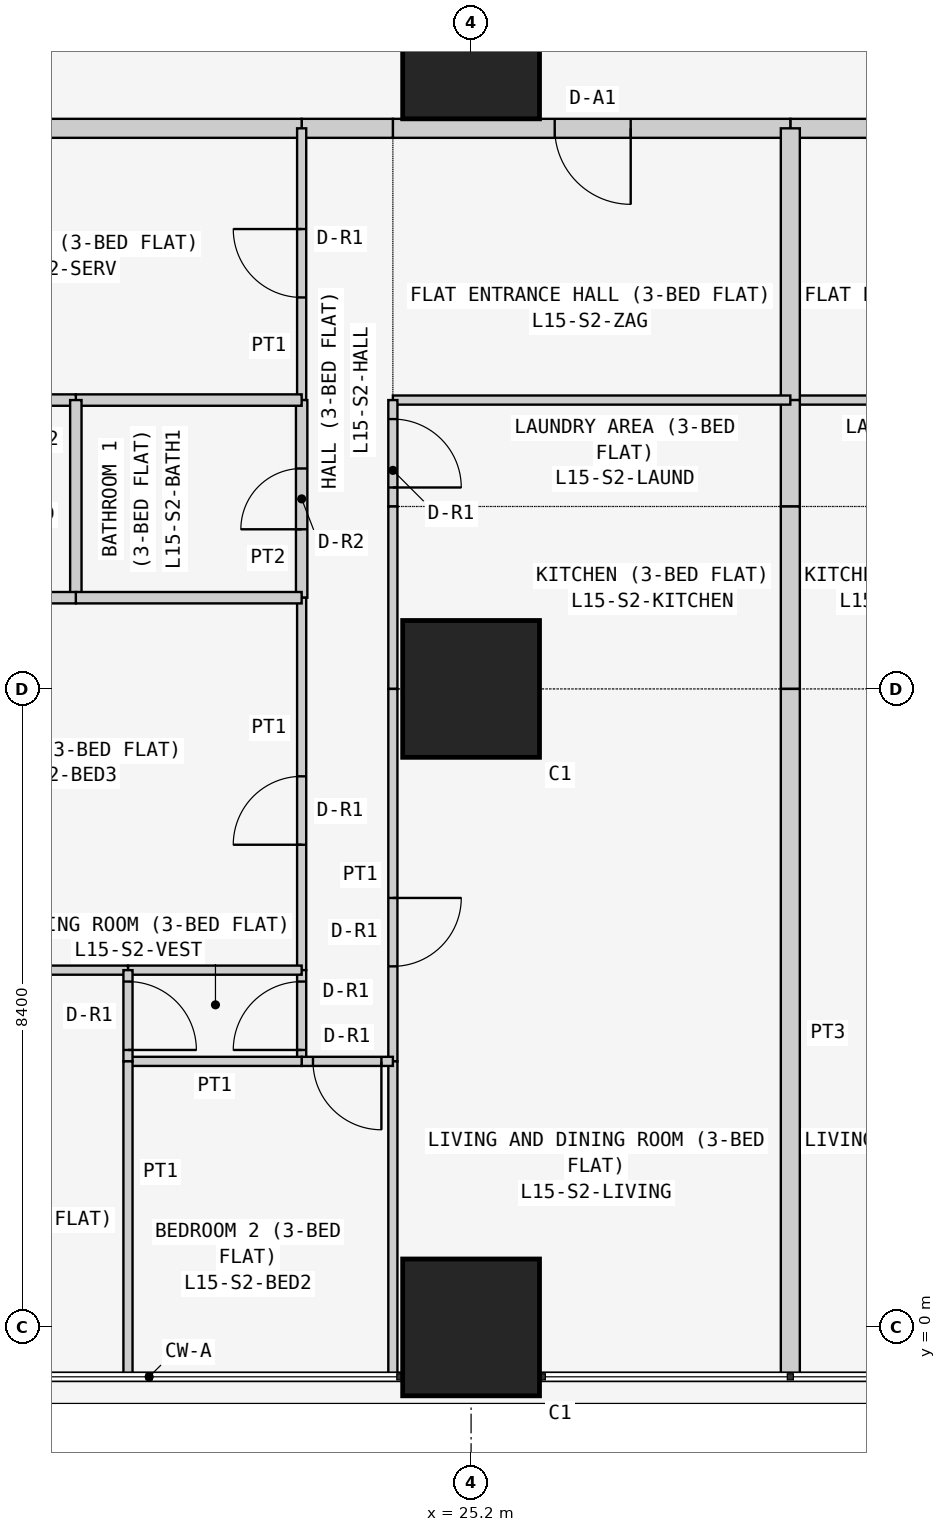
"""IFC4 building model, lengths in metres.
Left out: names, types, materials, properties, quantities, classifications, styles, units other than length and angle.
Written with IfcOpenShell. Run it as: python <this file> out.ifc"""

import sys

from ifc_helpers import new_model, si_unit, direction, frame, frame_2d, origin, origin_2d, place, context, subcontext, project, spatial, rectangle, extrude, element, fill, save


model = new_model("IFC4")
c1 = context("Model", 3, precision=1e-05, world=origin(), true_north=direction((0.0, 1.0)))
c2 = subcontext(c1, "Body", "Model", "MODEL_VIEW")
j1 = project(units=[si_unit("LENGTHUNIT", "METRE"), si_unit("PLANEANGLEUNIT", "RADIAN")], contexts=[c1])
p1 = place(None, origin())
s1 = spatial("IfcSite", under=j1, at=p1, CompositionType="ELEMENT")
p2 = place(p1, origin())
s2 = spatial("IfcBuilding", under=s1, at=p2, CompositionType="ELEMENT")
p3 = place(p2, frame((0.0, 0.0, 63.3)))
s3 = spatial("IfcBuildingStorey", under=s2, at=p3, CompositionType="ELEMENT", Elevation=63.3)
for number, where, z_axis, x_axis in (
    (1, (25.2, 0.0, 0.0), (0.0, 0.0, 1.0), (1.0, 0.0, 0.0)),
    (2, (25.2, 8.4, 0.0), (0.0, 0.0, 1.0), (1.0, 0.0, 0.0)),
    (3, (25.2, 16.8, 0.0), (0.0, 0.0, 1.0), (1.0, 0.0, 0.0)),
):
    element("IfcColumn", number, at=place(p3, frame(where, z_axis=z_axis, x_axis=x_axis)), inside=s3, PredefinedType="COLUMN", context=c2, shape_type="SweptSolid", body=[
        extrude(rectangle(XDim=1.8, YDim=1.8, at=origin_2d()), origin(), (0.0, 0.0, 1.0), 3.6),
    ])
p4 = place(p3, frame((34.629, 15.775, 0.0), z_axis=(0.0, 0.0, 1.0), x_axis=(-1.0, 0.0, 0.0)))
e4 = element("IfcWall", 4, at=p4, inside=s3, PredefinedType="PARTITIONING", context=c2, shape_type="SweptSolid", body=[
    extrude(rectangle(XDim=5.229, YDim=0.25, at=frame_2d((2.615, 0.0))), origin(), (0.0, 0.0, 1.0), 3.45),
])
p5 = place(p4, frame((2.129, 0.0, 0.0)))
e5 = element("IfcOpeningElement", 5, at=p5, cuts=e4, PredefinedType="OPENING", context=c2, shape_type="SweptSolid", body=[
    extrude(rectangle(XDim=1.0, YDim=2.1, at=frame_2d((0.5, 1.05))), frame((0.0, 0.135, 0.0), z_axis=(0.0, -1.0, 0.0), x_axis=(1.0, 0.0, 0.0)), (0.0, 0.0, 1.0), 0.27),
])
p6 = place(p3, frame((29.4, 15.775, 0.0), z_axis=(0.0, 0.0, 1.0), x_axis=(-1.0, 0.0, 0.0)))
e6 = element("IfcWall", 6, at=p6, inside=s3, PredefinedType="PARTITIONING", context=c2, shape_type="SweptSolid", body=[
    extrude(rectangle(XDim=5.229, YDim=0.25, at=frame_2d((2.615, 0.0))), origin(), (0.0, 0.0, 1.0), 3.45),
])
p7 = place(p6, frame((2.1, 0.0, 0.0)))
e7 = element("IfcOpeningElement", 7, at=p7, cuts=e6, PredefinedType="OPENING", context=c2, shape_type="SweptSolid", body=[
    extrude(rectangle(XDim=1.0, YDim=2.1, at=frame_2d((0.5, 1.05))), frame((0.0, 0.135, 0.0), z_axis=(0.0, -1.0, 0.0), x_axis=(1.0, 0.0, 0.0)), (0.0, 0.0, 1.0), 0.27),
])
p8 = place(p3, frame((24.171, 15.775, 0.0), z_axis=(0.0, 0.0, 1.0), x_axis=(-1.0, 0.0, 0.0)))
e8 = element("IfcWall", 8, at=p8, inside=s3, PredefinedType="PARTITIONING", context=c2, shape_type="SweptSolid", body=[
    extrude(rectangle(XDim=1.2, YDim=0.25, at=frame_2d((0.6, 0.0))), origin(), (0.0, 0.0, 1.0), 3.45),
])
p9 = place(p3, frame((22.971, 15.775, 0.0), z_axis=(0.0, 0.0, 1.0), x_axis=(-1.0, 0.0, 0.0)))
e9 = element("IfcWall", 9, at=p9, inside=s3, PredefinedType="PARTITIONING", context=c2, shape_type="SweptSolid", body=[
    extrude(rectangle(XDim=6.871, YDim=0.25, at=frame_2d((3.436, 0.0))), origin(), (0.0, 0.0, 1.0), 3.45),
])
p10 = place(p3, frame((29.4, 12.2, 0.0), z_axis=(0.0, 0.0, 1.0), x_axis=(1.0, 0.0, 0.0)))
e10 = element("IfcWall", 10, at=p10, inside=s3, PredefinedType="PARTITIONING", context=c2, shape_type="SweptSolid", body=[
    extrude(rectangle(XDim=5.229, YDim=0.12, at=frame_2d((2.615, 0.0))), origin(), (0.0, 0.0, 1.0), 3.45),
])
p11 = place(p3, frame((29.4, 15.775, 0.0), z_axis=(0.0, 0.0, 1.0), x_axis=(0.0, -1.0, 0.0)))
e11 = element("IfcWall", 11, at=p11, inside=s3, PredefinedType="PARTITIONING", context=c2, shape_type="SweptSolid", body=[
    extrude(rectangle(XDim=3.575, YDim=0.25, at=frame_2d((1.788, 0.0))), origin(), (0.0, 0.0, 1.0), 2.848),
])
p12 = place(p3, frame((29.4, 12.2, 0.0), z_axis=(0.0, 0.0, 1.0), x_axis=(0.0, -1.0, 0.0)))
e12 = element("IfcWall", 12, at=p12, inside=s3, PredefinedType="PARTITIONING", context=c2, shape_type="SweptSolid", body=[
    extrude(rectangle(XDim=1.4, YDim=0.25, at=frame_2d((0.7, 0.0))), origin(), (0.0, 0.0, 1.0), 2.848),
])
p13 = place(p3, frame((29.4, 10.8, 0.0), z_axis=(0.0, 0.0, 1.0), x_axis=(0.0, -1.0, 0.0)))
e13 = element("IfcWall", 13, at=p13, inside=s3, PredefinedType="PARTITIONING", context=c2, shape_type="SweptSolid", body=[
    extrude(rectangle(XDim=2.4, YDim=0.25, at=frame_2d((1.2, 0.0))), origin(), (0.0, 0.0, 1.0), 2.848),
])
p14 = place(p3, frame((29.4, 8.4, 0.0), z_axis=(0.0, 0.0, 1.0), x_axis=(0.0, -1.0, 0.0)))
e14 = element("IfcWall", 14, at=p14, inside=s3, PredefinedType="PARTITIONING", context=c2, shape_type="SweptSolid", body=[
    extrude(rectangle(XDim=9.05, YDim=0.25, at=frame_2d((4.525, 0.0))), origin(), (0.0, 0.0, 1.0), 2.848),
])
p15 = place(p3, frame((29.4, 12.2, 0.0), z_axis=(0.0, 0.0, 1.0), x_axis=(-1.0, 0.0, 0.0)))
e15 = element("IfcWall", 15, at=p15, inside=s3, PredefinedType="PARTITIONING", context=c2, shape_type="SweptSolid", body=[
    extrude(rectangle(XDim=5.229, YDim=0.12, at=frame_2d((2.615, 0.0))), origin(), (0.0, 0.0, 1.0), 3.45),
])
p16 = place(p3, frame((24.171, 10.8, 0.0), z_axis=(0.0, 0.0, 1.0), x_axis=(0.0, 1.0, 0.0)))
e16 = element("IfcWall", 16, at=p16, inside=s3, PredefinedType="PARTITIONING", context=c2, shape_type="SweptSolid", body=[
    extrude(rectangle(XDim=1.4, YDim=0.12, at=frame_2d((0.7, 0.0))), origin(), (0.0, 0.0, 1.0), 3.45),
])
p17 = place(p16, frame((0.25, 0.0, 0.0)))
e17 = element("IfcOpeningElement", 17, at=p17, cuts=e16, PredefinedType="OPENING", context=c2, shape_type="SweptSolid", body=[
    extrude(rectangle(XDim=0.9, YDim=2.1, at=frame_2d((0.45, 1.05))), frame((0.0, 0.07, 0.0), z_axis=(0.0, -1.0, 0.0), x_axis=(1.0, 0.0, 0.0)), (0.0, 0.0, 1.0), 0.14),
])
p18 = place(p3, frame((24.171, 8.4, 0.0), z_axis=(0.0, 0.0, 1.0), x_axis=(0.0, 1.0, 0.0)))
e18 = element("IfcWall", 18, at=p18, inside=s3, PredefinedType="PARTITIONING", context=c2, shape_type="SweptSolid", body=[
    extrude(rectangle(XDim=2.4, YDim=0.12, at=frame_2d((1.2, 0.0))), origin(), (0.0, 0.0, 1.0), 3.45),
])
p19 = place(p3, frame((24.171, 3.5, 0.0), z_axis=(0.0, 0.0, 1.0), x_axis=(0.0, 1.0, 0.0)))
e19 = element("IfcWall", 19, at=p19, inside=s3, PredefinedType="PARTITIONING", context=c2, shape_type="SweptSolid", body=[
    extrude(rectangle(XDim=4.9, YDim=0.12, at=frame_2d((2.45, 0.0))), origin(), (0.0, 0.0, 1.0), 3.45),
])
p20 = place(p19, frame((1.25, 0.0, 0.0)))
e20 = element("IfcOpeningElement", 20, at=p20, cuts=e19, PredefinedType="OPENING", context=c2, shape_type="SweptSolid", body=[
    extrude(rectangle(XDim=0.9, YDim=2.1, at=frame_2d((0.45, 1.05))), frame((0.0, 0.07, 0.0), z_axis=(0.0, -1.0, 0.0), x_axis=(1.0, 0.0, 0.0)), (0.0, 0.0, 1.0), 0.14),
])
p21 = place(p3, frame((24.171, -0.65, 0.0), z_axis=(0.0, 0.0, 1.0), x_axis=(0.0, 1.0, 0.0)))
e21 = element("IfcWall", 21, at=p21, inside=s3, PredefinedType="PARTITIONING", context=c2, shape_type="SweptSolid", body=[
    extrude(rectangle(XDim=4.15, YDim=0.12, at=frame_2d((2.075, 0.0))), origin(), (0.0, 0.0, 1.0), 3.45),
])
p22 = place(p3, frame((22.971, 12.2, 0.0), z_axis=(0.0, 0.0, 1.0), x_axis=(0.0, 1.0, 0.0)))
e22 = element("IfcWall", 22, at=p22, inside=s3, PredefinedType="PARTITIONING", context=c2, shape_type="SweptSolid", body=[
    extrude(rectangle(XDim=3.575, YDim=0.12, at=frame_2d((1.788, 0.0))), origin(), (0.0, 0.0, 1.0), 3.45),
])
p23 = place(p22, frame((1.35, 0.0, 0.0)))
e23 = element("IfcOpeningElement", 23, at=p23, cuts=e22, PredefinedType="OPENING", context=c2, shape_type="SweptSolid", body=[
    extrude(rectangle(XDim=0.9, YDim=2.1, at=frame_2d((0.45, 1.05))), frame((0.0, 0.07, 0.0), z_axis=(0.0, -1.0, 0.0), x_axis=(1.0, 0.0, 0.0)), (0.0, 0.0, 1.0), 0.14),
])
p24 = place(p3, frame((22.971, 9.6, 0.0), z_axis=(0.0, 0.0, 1.0), x_axis=(0.0, 1.0, 0.0)))
e24 = element("IfcWall", 24, at=p24, inside=s3, PredefinedType="PARTITIONING", context=c2, shape_type="SweptSolid", body=[
    extrude(rectangle(XDim=2.6, YDim=0.15, at=frame_2d((1.3, 0.0))), origin(), (0.0, 0.0, 1.0), 3.45),
])
p25 = place(p24, frame((0.9, 0.0, 0.0)))
e25 = element("IfcOpeningElement", 25, at=p25, cuts=e24, PredefinedType="OPENING", context=c2, shape_type="SweptSolid", body=[
    extrude(rectangle(XDim=0.8, YDim=2.1, at=frame_2d((0.4, 1.05))), frame((0.0, 0.085, 0.0), z_axis=(0.0, -1.0, 0.0), x_axis=(1.0, 0.0, 0.0)), (0.0, 0.0, 1.0), 0.17),
])
p26 = place(p3, frame((22.971, 4.7, 0.0), z_axis=(0.0, 0.0, 1.0), x_axis=(0.0, 1.0, 0.0)))
e26 = element("IfcWall", 26, at=p26, inside=s3, PredefinedType="PARTITIONING", context=c2, shape_type="SweptSolid", body=[
    extrude(rectangle(XDim=4.9, YDim=0.12, at=frame_2d((2.45, 0.0))), origin(), (0.0, 0.0, 1.0), 3.45),
])
p27 = place(p26, frame((1.65, 0.0, 0.0)))
e27 = element("IfcOpeningElement", 27, at=p27, cuts=e26, PredefinedType="OPENING", context=c2, shape_type="SweptSolid", body=[
    extrude(rectangle(XDim=0.9, YDim=2.1, at=frame_2d((0.45, 1.05))), frame((0.0, 0.07, 0.0), z_axis=(0.0, -1.0, 0.0), x_axis=(1.0, 0.0, 0.0)), (0.0, 0.0, 1.0), 0.14),
])
p28 = place(p3, frame((22.971, 3.5, 0.0), z_axis=(0.0, 0.0, 1.0), x_axis=(0.0, 1.0, 0.0)))
e28 = element("IfcWall", 28, at=p28, inside=s3, PredefinedType="PARTITIONING", context=c2, shape_type="SweptSolid", body=[
    extrude(rectangle(XDim=1.2, YDim=0.12, at=frame_2d((0.6, 0.0))), origin(), (0.0, 0.0, 1.0), 3.45),
])
p29 = place(p28, frame((0.15, 0.0, 0.0)))
e29 = element("IfcOpeningElement", 29, at=p29, cuts=e28, PredefinedType="OPENING", context=c2, shape_type="SweptSolid", body=[
    extrude(rectangle(XDim=0.9, YDim=2.1, at=frame_2d((0.45, 1.05))), frame((0.0, 0.07, 0.0), z_axis=(0.0, -1.0, 0.0), x_axis=(1.0, 0.0, 0.0)), (0.0, 0.0, 1.0), 0.14),
])
p30 = place(p3, frame((24.171, 3.5, 0.0), z_axis=(0.0, 0.0, 1.0), x_axis=(-1.0, 0.0, 0.0)))
e30 = element("IfcWall", 30, at=p30, inside=s3, PredefinedType="PARTITIONING", context=c2, shape_type="SweptSolid", body=[
    extrude(rectangle(XDim=1.2, YDim=0.12, at=frame_2d((0.6, 0.0))), origin(), (0.0, 0.0, 1.0), 3.45),
])
p31 = place(p30, frame((0.151, 0.0, 0.0)))
e31 = element("IfcOpeningElement", 31, at=p31, cuts=e30, PredefinedType="OPENING", context=c2, shape_type="SweptSolid", body=[
    extrude(rectangle(XDim=0.9, YDim=2.1, at=frame_2d((0.45, 1.05))), frame((0.0, 0.07, 0.0), z_axis=(0.0, -1.0, 0.0), x_axis=(1.0, 0.0, 0.0)), (0.0, 0.0, 1.0), 0.14),
])
p32 = place(p3, frame((22.971, 12.2, 0.0), z_axis=(0.0, 0.0, 1.0), x_axis=(-1.0, 0.0, 0.0)))
e32 = element("IfcWall", 32, at=p32, inside=s3, PredefinedType="PARTITIONING", context=c2, shape_type="SweptSolid", body=[
    extrude(rectangle(XDim=2.971, YDim=0.15, at=frame_2d((1.485, 0.0))), origin(), (0.0, 0.0, 1.0), 3.45),
])
p33 = place(p3, frame((20.0, 12.2, 0.0), z_axis=(0.0, 0.0, 1.0), x_axis=(-1.0, 0.0, 0.0)))
e33 = element("IfcWall", 33, at=p33, inside=s3, PredefinedType="PARTITIONING", context=c2, shape_type="SweptSolid", body=[
    extrude(rectangle(XDim=3.9, YDim=0.15, at=frame_2d((1.95, 0.0))), origin(), (0.0, 0.0, 1.0), 3.45),
])
p34 = place(p33, frame((1.45, 0.0, 0.0)))
e34 = element("IfcOpeningElement", 34, at=p34, cuts=e33, PredefinedType="OPENING", context=c2, shape_type="SweptSolid", body=[
    extrude(rectangle(XDim=0.8, YDim=2.1, at=frame_2d((0.4, 1.05))), frame((0.0, 0.085, 0.0), z_axis=(0.0, -1.0, 0.0), x_axis=(1.0, 0.0, 0.0)), (0.0, 0.0, 1.0), 0.17),
])
p35 = place(p3, frame((20.0, 9.6, 0.0), z_axis=(0.0, 0.0, 1.0), x_axis=(0.0, 1.0, 0.0)))
e35 = element("IfcWall", 35, at=p35, inside=s3, PredefinedType="PARTITIONING", context=c2, shape_type="SweptSolid", body=[
    extrude(rectangle(XDim=2.6, YDim=0.15, at=frame_2d((1.3, 0.0))), origin(), (0.0, 0.0, 1.0), 3.45),
])
p36 = place(p3, frame((22.971, 9.6, 0.0), z_axis=(0.0, 0.0, 1.0), x_axis=(-1.0, 0.0, 0.0)))
e36 = element("IfcWall", 36, at=p36, inside=s3, PredefinedType="PARTITIONING", context=c2, shape_type="SweptSolid", body=[
    extrude(rectangle(XDim=2.971, YDim=0.15, at=frame_2d((1.485, 0.0))), origin(), (0.0, 0.0, 1.0), 3.45),
])
p37 = place(p3, frame((20.0, 9.6, 0.0), z_axis=(0.0, 0.0, 1.0), x_axis=(-1.0, 0.0, 0.0)))
e37 = element("IfcWall", 37, at=p37, inside=s3, PredefinedType="PARTITIONING", context=c2, shape_type="SweptSolid", body=[
    extrude(rectangle(XDim=3.9, YDim=0.15, at=frame_2d((1.95, 0.0))), origin(), (0.0, 0.0, 1.0), 3.45),
])
p38 = place(p3, frame((22.971, 4.7, 0.0), z_axis=(0.0, 0.0, 1.0), x_axis=(-1.0, 0.0, 0.0)))
e38 = element("IfcWall", 38, at=p38, inside=s3, PredefinedType="PARTITIONING", context=c2, shape_type="SweptSolid", body=[
    extrude(rectangle(XDim=2.285, YDim=0.12, at=frame_2d((1.143, 0.0))), origin(), (0.0, 0.0, 1.0), 3.45),
])
p39 = place(p3, frame((20.686, 4.7, 0.0), z_axis=(0.0, 0.0, 1.0), x_axis=(-1.0, 0.0, 0.0)))
e39 = element("IfcWall", 39, at=p39, inside=s3, PredefinedType="PARTITIONING", context=c2, shape_type="SweptSolid", body=[
    extrude(rectangle(XDim=4.586, YDim=0.12, at=frame_2d((2.293, 0.0))), origin(), (0.0, 0.0, 1.0), 3.45),
])
p40 = place(p3, frame((22.971, 3.5, 0.0), z_axis=(0.0, 0.0, 1.0), x_axis=(-1.0, 0.0, 0.0)))
e40 = element("IfcWall", 40, at=p40, inside=s3, PredefinedType="PARTITIONING", context=c2, shape_type="SweptSolid", body=[
    extrude(rectangle(XDim=2.285, YDim=0.12, at=frame_2d((1.143, 0.0))), origin(), (0.0, 0.0, 1.0), 3.45),
])
p41 = place(p3, frame((20.686, 3.5, 0.0), z_axis=(0.0, 0.0, 1.0), x_axis=(0.0, 1.0, 0.0)))
e41 = element("IfcWall", 41, at=p41, inside=s3, PredefinedType="PARTITIONING", context=c2, shape_type="SweptSolid", body=[
    extrude(rectangle(XDim=1.2, YDim=0.12, at=frame_2d((0.6, 0.0))), origin(), (0.0, 0.0, 1.0), 3.45),
])
p42 = place(p41, frame((0.15, 0.0, 0.0)))
e42 = element("IfcOpeningElement", 42, at=p42, cuts=e41, PredefinedType="OPENING", context=c2, shape_type="SweptSolid", body=[
    extrude(rectangle(XDim=0.9, YDim=2.1, at=frame_2d((0.45, 1.05))), frame((0.0, 0.07, 0.0), z_axis=(0.0, -1.0, 0.0), x_axis=(1.0, 0.0, 0.0)), (0.0, 0.0, 1.0), 0.14),
])
p43 = place(p3, frame((20.686, -0.65, 0.0), z_axis=(0.0, 0.0, 1.0), x_axis=(0.0, 1.0, 0.0)))
e43 = element("IfcWall", 43, at=p43, inside=s3, PredefinedType="PARTITIONING", context=c2, shape_type="SweptSolid", body=[
    extrude(rectangle(XDim=4.15, YDim=0.12, at=frame_2d((2.075, 0.0))), origin(), (0.0, 0.0, 1.0), 3.45),
])
p44 = place(p7, origin())
e44 = element("IfcDoor", 44, at=p44, inside=s3, OperationType="SINGLE_SWING_LEFT", PredefinedType="DOOR", context=c2, shape_type="SweptSolid", body=[
    extrude(rectangle(XDim=1.0, YDim=2.1, at=frame_2d((0.5, 1.05))), frame((0.0, 0.025, 0.0), z_axis=(0.0, -1.0, 0.0), x_axis=(1.0, 0.0, 0.0)), (0.0, 0.0, 1.0), 0.05),
])
fill(e7, e44)
p45 = place(p17, frame((0.9, 0.0, 0.0), z_axis=(0.0, 0.0, 1.0), x_axis=(-1.0, 0.0, 0.0)))
e45 = element("IfcDoor", 45, at=p45, inside=s3, OperationType="SINGLE_SWING_RIGHT", PredefinedType="DOOR", context=c2, shape_type="SweptSolid", body=[
    extrude(rectangle(XDim=0.9, YDim=2.1, at=frame_2d((0.45, 1.05))), frame((0.0, 0.025, 0.0), z_axis=(0.0, -1.0, 0.0), x_axis=(1.0, 0.0, 0.0)), (0.0, 0.0, 1.0), 0.05),
])
fill(e17, e45)
p46 = place(p20, frame((0.9, 0.0, 0.0), z_axis=(0.0, 0.0, 1.0), x_axis=(-1.0, 0.0, 0.0)))
e46 = element("IfcDoor", 46, at=p46, inside=s3, OperationType="SINGLE_SWING_LEFT", PredefinedType="DOOR", context=c2, shape_type="SweptSolid", body=[
    extrude(rectangle(XDim=0.9, YDim=2.1, at=frame_2d((0.45, 1.05))), frame((0.0, 0.025, 0.0), z_axis=(0.0, -1.0, 0.0), x_axis=(1.0, 0.0, 0.0)), (0.0, 0.0, 1.0), 0.05),
])
fill(e20, e46)
p47 = place(p23, origin())
e47 = element("IfcDoor", 47, at=p47, inside=s3, OperationType="SINGLE_SWING_RIGHT", PredefinedType="DOOR", context=c2, shape_type="SweptSolid", body=[
    extrude(rectangle(XDim=0.9, YDim=2.1, at=frame_2d((0.45, 1.05))), frame((0.0, 0.025, 0.0), z_axis=(0.0, -1.0, 0.0), x_axis=(1.0, 0.0, 0.0)), (0.0, 0.0, 1.0), 0.05),
])
fill(e23, e47)
p48 = place(p25, origin())
e48 = element("IfcDoor", 48, at=p48, inside=s3, OperationType="SINGLE_SWING_LEFT", PredefinedType="DOOR", context=c2, shape_type="SweptSolid", body=[
    extrude(rectangle(XDim=0.8, YDim=2.1, at=frame_2d((0.4, 1.05))), frame((0.0, 0.025, 0.0), z_axis=(0.0, -1.0, 0.0), x_axis=(1.0, 0.0, 0.0)), (0.0, 0.0, 1.0), 0.05),
])
fill(e25, e48)
p49 = place(p27, origin())
e49 = element("IfcDoor", 49, at=p49, inside=s3, OperationType="SINGLE_SWING_LEFT", PredefinedType="DOOR", context=c2, shape_type="SweptSolid", body=[
    extrude(rectangle(XDim=0.9, YDim=2.1, at=frame_2d((0.45, 1.05))), frame((0.0, 0.025, 0.0), z_axis=(0.0, -1.0, 0.0), x_axis=(1.0, 0.0, 0.0)), (0.0, 0.0, 1.0), 0.05),
])
fill(e27, e49)
p50 = place(p29, origin())
e50 = element("IfcDoor", 50, at=p50, inside=s3, OperationType="SINGLE_SWING_LEFT", PredefinedType="DOOR", context=c2, shape_type="SweptSolid", body=[
    extrude(rectangle(XDim=0.9, YDim=2.1, at=frame_2d((0.45, 1.05))), frame((0.0, 0.025, 0.0), z_axis=(0.0, -1.0, 0.0), x_axis=(1.0, 0.0, 0.0)), (0.0, 0.0, 1.0), 0.05),
])
fill(e29, e50)
p51 = place(p42, frame((0.9, 0.0, 0.0), z_axis=(0.0, 0.0, 1.0), x_axis=(-1.0, 0.0, 0.0)))
e51 = element("IfcDoor", 51, at=p51, inside=s3, OperationType="SINGLE_SWING_RIGHT", PredefinedType="DOOR", context=c2, shape_type="SweptSolid", body=[
    extrude(rectangle(XDim=0.9, YDim=2.1, at=frame_2d((0.45, 1.05))), frame((0.0, 0.025, 0.0), z_axis=(0.0, -1.0, 0.0), x_axis=(1.0, 0.0, 0.0)), (0.0, 0.0, 1.0), 0.05),
])
fill(e42, e51)
p52 = place(p31, origin())
e52 = element("IfcDoor", 52, at=p52, inside=s3, OperationType="SINGLE_SWING_LEFT", PredefinedType="DOOR", context=c2, shape_type="SweptSolid", body=[
    extrude(rectangle(XDim=0.9, YDim=2.1, at=frame_2d((0.45, 1.05))), frame((0.0, 0.025, 0.0), z_axis=(0.0, -1.0, 0.0), x_axis=(1.0, 0.0, 0.0)), (0.0, 0.0, 1.0), 0.05),
])
fill(e31, e52)
save(model, sys.argv[1])
